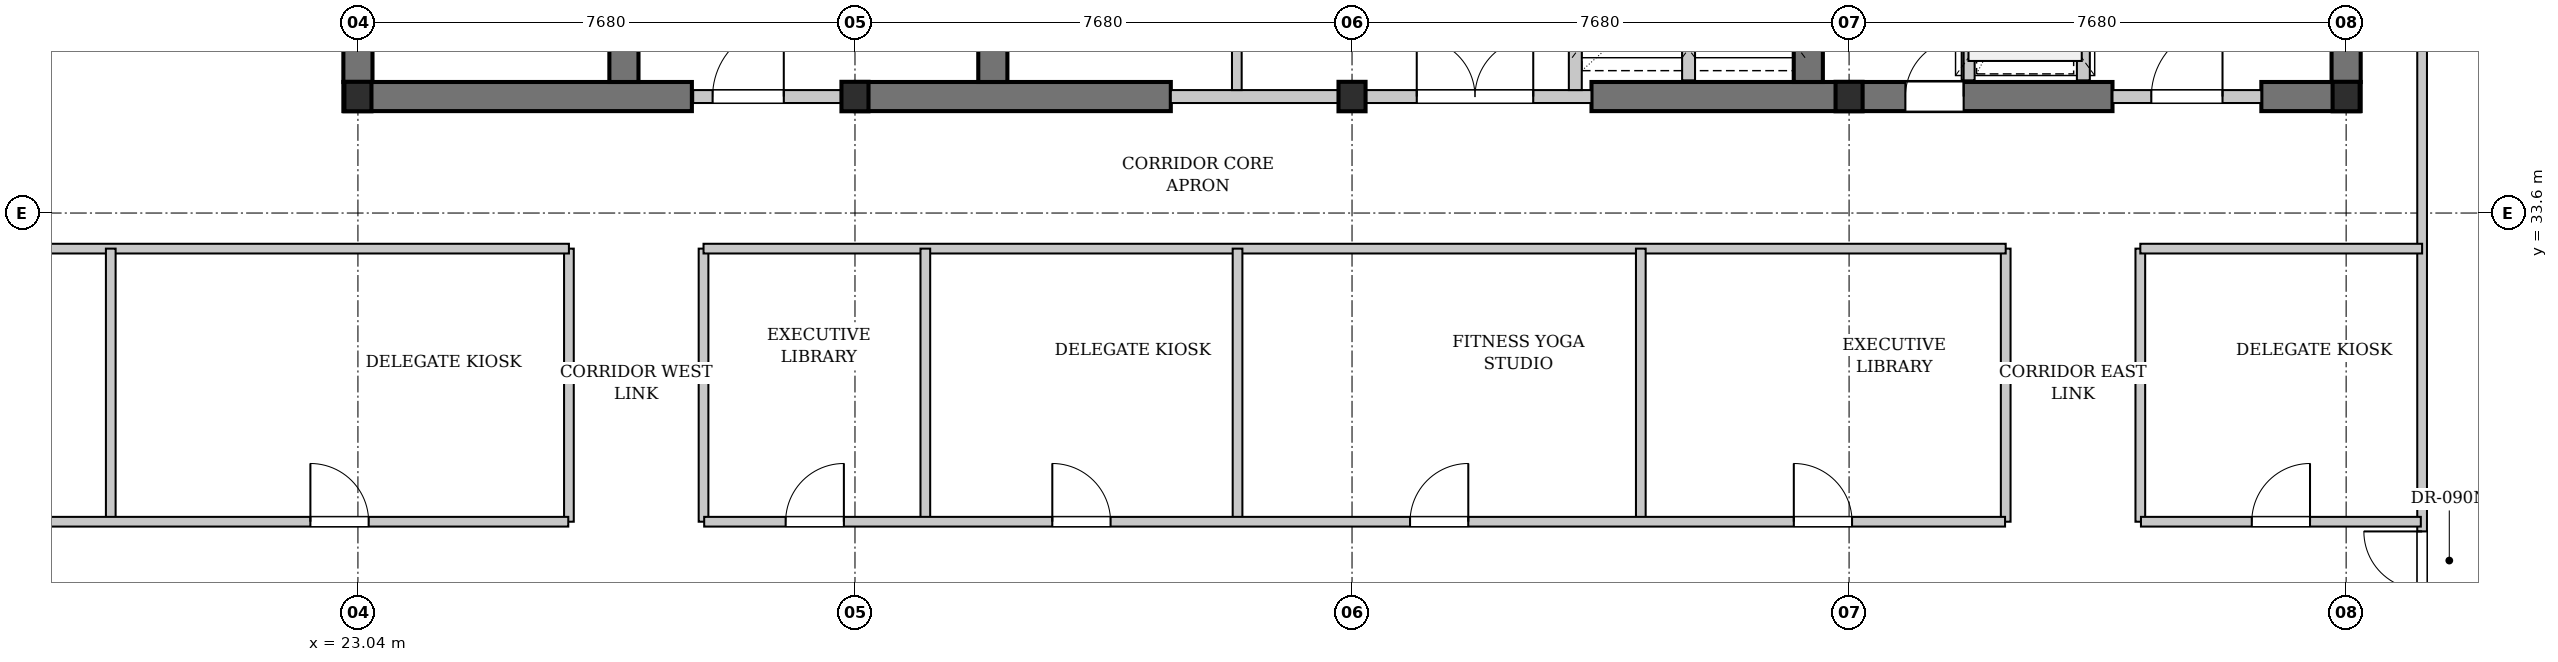
"""IFC4 building model, lengths in metres.
Left out: names, types, materials, properties, quantities, classifications, styles, units other than length and angle.
Written with IfcOpenShell. Run it as: python <this file> out.ifc"""

import sys

from ifc_helpers import new_model, si_unit, direction, frame, frame_2d, origin, origin_2d, place, context, subcontext, project, spatial, rectangle, i_section, extrude, element, fill, save


model = new_model("IFC4")
c1 = context("Model", 3, precision=1e-05, world=origin(), true_north=direction((0.0, 1.0)))
c2 = subcontext(c1, "Body", "Model", "MODEL_VIEW")
j1 = project(units=[si_unit("LENGTHUNIT", "METRE"), si_unit("PLANEANGLEUNIT", "RADIAN")], contexts=[c1])
p1 = place(None, origin())
s1 = spatial("IfcSite", under=j1, at=p1, CompositionType="ELEMENT")
p2 = place(p1, origin())
s2 = spatial("IfcBuilding", under=s1, at=p2, CompositionType="ELEMENT")
p3 = place(p2, frame((0.0, 0.0, 172.1)))
s3 = spatial("IfcBuildingStorey", under=s2, at=p3, CompositionType="ELEMENT", Elevation=172.1)
p4 = place(p3, frame((22.815, 35.4, 0.0), z_axis=(0.0, 0.0, 1.0), x_axis=(1.0, 0.0, 0.0)))
e1 = element("IfcWall", 1, at=p4, inside=s3, PredefinedType="SHEAR", context=c2, shape_type="SweptSolid", body=[
    extrude(rectangle(XDim=5.385, YDim=0.45, at=frame_2d((2.692, 0.0))), origin(), (0.0, 0.0, 1.0), 3.08),
])
p5 = place(p3, frame((30.72, 35.4, 0.0), z_axis=(0.0, 0.0, 1.0), x_axis=(1.0, 0.0, 0.0)))
e2 = element("IfcWall", 2, at=p5, inside=s3, PredefinedType="SHEAR", context=c2, shape_type="SweptSolid", body=[
    extrude(rectangle(XDim=4.88, YDim=0.45, at=frame_2d((2.44, 0.0))), origin(), (0.0, 0.0, 1.0), 3.08),
])
p6 = place(p3, frame((42.1, 35.4, 0.0), z_axis=(0.0, 0.0, 1.0), x_axis=(1.0, 0.0, 0.0)))
e3 = element("IfcWall", 3, at=p6, inside=s3, PredefinedType="SHEAR", context=c2, shape_type="SweptSolid", body=[
    extrude(rectangle(XDim=8.05, YDim=0.45, at=frame_2d((4.025, 0.0))), origin(), (0.0, 0.0, 1.0), 3.08),
])
p7 = place(p6, frame((4.85, 0.0, 0.0)))
e4 = element("IfcOpeningElement", 4, at=p7, cuts=e3, PredefinedType="OPENING", context=c2, shape_type="SweptSolid", body=[
    extrude(rectangle(XDim=0.9, YDim=2.15, at=frame_2d((0.45, 1.075))), frame((0.0, 0.235, 0.0), z_axis=(0.0, -1.0, 0.0), x_axis=(1.0, 0.0, 0.0)), (0.0, 0.0, 1.0), 0.47),
])
p8 = place(p3, frame((52.45, 35.4, 0.0), z_axis=(0.0, 0.0, 1.0), x_axis=(1.0, 0.0, 0.0)))
e5 = element("IfcWall", 5, at=p8, inside=s3, PredefinedType="SHEAR", context=c2, shape_type="SweptSolid", body=[
    extrude(rectangle(XDim=1.535, YDim=0.45, at=frame_2d((0.768, 0.0))), origin(), (0.0, 0.0, 1.0), 3.08),
])
p9 = place(p3, frame((23.04, 35.625, 0.0), z_axis=(0.0, 0.0, 1.0), x_axis=(0.0, 1.0, 0.0)))
e6 = element("IfcWall", 6, at=p9, inside=s3, PredefinedType="SHEAR", context=c2, shape_type="SweptSolid", body=[
    extrude(rectangle(XDim=10.35, YDim=0.45, at=frame_2d((5.175, 0.0))), origin(), (0.0, 0.0, 1.0), 3.08),
])
p10 = place(p3, frame((27.15, 35.625, 0.0), z_axis=(0.0, 0.0, 1.0), x_axis=(0.0, 1.0, 0.0)))
e7 = element("IfcWall", 7, at=p10, inside=s3, PredefinedType="SHEAR", context=c2, shape_type="SweptSolid", body=[
    extrude(rectangle(XDim=10.35, YDim=0.45, at=frame_2d((5.175, 0.0))), origin(), (0.0, 0.0, 1.0), 3.08),
])
p11 = place(p10, frame((0.675, 0.0, 0.0)))
e8 = element("IfcOpeningElement", 8, at=p11, cuts=e7, PredefinedType="OPENING", context=c2, shape_type="SweptSolid", body=[
    extrude(rectangle(XDim=1.1, YDim=2.15, at=frame_2d((0.55, 1.075))), frame((0.0, 0.235, 0.0), z_axis=(0.0, -1.0, 0.0), x_axis=(1.0, 0.0, 0.0)), (0.0, 0.0, 1.0), 0.47),
])
for number, where, z_axis, x_axis in (
    (9, (32.85, 35.625, 0.0), (0.0, 0.0, 1.0), (0.0, 1.0, 0.0)),
    (10, (45.45, 35.625, 0.0), (0.0, 0.0, 1.0), (0.0, 1.0, 0.0)),
    (11, (53.76, 35.625, 0.0), (0.0, 0.0, 1.0), (0.0, 1.0, 0.0)),
):
    element("IfcWall", number, at=place(p3, frame(where, z_axis=z_axis, x_axis=x_axis)), inside=s3, PredefinedType="SHEAR", context=c2, shape_type="SweptSolid", body=[
        extrude(rectangle(XDim=10.35, YDim=0.45, at=frame_2d((5.175, 0.0))), origin(), (0.0, 0.0, 1.0), 3.08),
    ])
for number, where, z_axis, x_axis in (
    (12, (23.04, 35.4, 0.0), (0.0, 0.0, 1.0), (1.0, 0.0, 0.0)),
    (13, (30.72, 35.4, 0.0), (0.0, 0.0, 1.0), (1.0, 0.0, 0.0)),
    (14, (38.4, 35.4, 0.0), (0.0, 0.0, 1.0), (1.0, 0.0, 0.0)),
    (15, (46.08, 35.4, 0.0), (0.0, 0.0, 1.0), (1.0, 0.0, 0.0)),
    (16, (53.76, 35.4, 0.0), (0.0, 0.0, 1.0), (1.0, 0.0, 0.0)),
):
    element("IfcColumn", number, at=place(p3, frame(where, z_axis=z_axis, x_axis=x_axis)), inside=s3, PredefinedType="COLUMN", context=c2, shape_type="SweptSolid", body=[
        extrude(i_section(OverallWidth=0.418, OverallDepth=0.455, WebThickness=0.042, FlangeThickness=0.068, FilletRadius=0.015, at=origin_2d()), origin(), (0.0, 0.0, 1.0), 3.3),
    ])
p12 = place(p3, frame((28.22, 35.4, 0.0), z_axis=(0.0, 0.0, 1.0), x_axis=(1.0, 0.0, 0.0)))
e17 = element("IfcWall", 17, at=p12, inside=s3, PredefinedType="PARTITIONING", context=c2, shape_type="SweptSolid", body=[
    extrude(rectangle(XDim=2.5, YDim=0.2, at=frame_2d((1.25, 0.0))), origin(), (0.0, 0.0, 1.0), 2.475),
])
p13 = place(p12, frame((0.3, 0.0, 0.0)))
e18 = element("IfcOpeningElement", 18, at=p13, cuts=e17, PredefinedType="OPENING", context=c2, shape_type="SweptSolid", body=[
    extrude(rectangle(XDim=1.1, YDim=2.15, at=frame_2d((0.55, 1.075))), frame((0.0, 0.11, 0.0), z_axis=(0.0, -1.0, 0.0), x_axis=(1.0, 0.0, 0.0)), (0.0, 0.0, 1.0), 0.22),
])
p14 = place(p3, frame((35.6, 35.4, 0.0), z_axis=(0.0, 0.0, 1.0), x_axis=(1.0, 0.0, 0.0)))
e19 = element("IfcWall", 19, at=p14, inside=s3, PredefinedType="PARTITIONING", context=c2, shape_type="SweptSolid", body=[
    extrude(rectangle(XDim=6.5, YDim=0.2, at=frame_2d((3.25, 0.0))), origin(), (0.0, 0.0, 1.0), 2.475),
])
p15 = place(p14, frame((3.8, 0.0, 0.0)))
e20 = element("IfcOpeningElement", 20, at=p15, cuts=e19, PredefinedType="OPENING", context=c2, shape_type="SweptSolid", body=[
    extrude(rectangle(XDim=1.8, YDim=2.3, at=frame_2d((0.9, 1.15))), frame((0.0, 0.11, 0.0), z_axis=(0.0, -1.0, 0.0), x_axis=(1.0, 0.0, 0.0)), (0.0, 0.0, 1.0), 0.22),
])
p16 = place(p3, frame((36.62, 35.5, 0.0), z_axis=(0.0, 0.0, 1.0), x_axis=(0.0, 1.0, 0.0)))
e21 = element("IfcWall", 21, at=p16, inside=s3, PredefinedType="PARTITIONING", context=c2, shape_type="SweptSolid", body=[
    extrude(rectangle(XDim=10.42, YDim=0.15, at=frame_2d((5.21, 0.0))), origin(), (0.0, 0.0, 1.0), 3.08),
])
p17 = place(p16, frame((3.92, 0.0, 0.0)))
e22 = element("IfcOpeningElement", 22, at=p17, cuts=e21, PredefinedType="OPENING", context=c2, shape_type="SweptSolid", body=[
    extrude(rectangle(XDim=0.9, YDim=2.15, at=frame_2d((0.45, 1.075))), frame((0.0, 0.085, 0.0), z_axis=(0.0, -1.0, 0.0), x_axis=(1.0, 0.0, 0.0)), (0.0, 0.0, 1.0), 0.17),
])
p18 = place(p16, frame((5.85, 0.0, 0.0)))
e23 = element("IfcOpeningElement", 23, at=p18, cuts=e21, PredefinedType="OPENING", context=c2, shape_type="SweptSolid", body=[
    extrude(rectangle(XDim=0.9, YDim=2.15, at=frame_2d((0.45, 1.075))), frame((0.0, 0.085, 0.0), z_axis=(0.0, -1.0, 0.0), x_axis=(1.0, 0.0, 0.0)), (0.0, 0.0, 1.0), 0.17),
])
p19 = place(p3, frame((43.6, 35.65, 0.0), z_axis=(0.0, 0.0, 1.0), x_axis=(0.0, 1.0, 0.0)))
e24 = element("IfcWall", 24, at=p19, inside=s3, PredefinedType="PARTITIONING", context=c2, shape_type="SweptSolid", body=[
    extrude(rectangle(XDim=3.25, YDim=0.2, at=frame_2d((1.625, 0.0))), origin(), (0.0, 0.0, 1.0), 3.08),
])
p20 = place(p3, frame((41.85, 35.5, 0.0), z_axis=(0.0, 0.0, 1.0), x_axis=(0.0, 1.0, 0.0)))
e25 = element("IfcWall", 25, at=p20, inside=s3, PredefinedType="PARTITIONING", context=c2, shape_type="SweptSolid", body=[
    extrude(rectangle(XDim=3.4, YDim=0.2, at=frame_2d((1.7, 0.0))), origin(), (0.0, 0.0, 1.0), 3.08),
])
p21 = place(p3, frame((50.15, 35.4, 0.0), z_axis=(0.0, 0.0, 1.0), x_axis=(1.0, 0.0, 0.0)))
e26 = element("IfcWall", 26, at=p21, inside=s3, PredefinedType="PARTITIONING", context=c2, shape_type="SweptSolid", body=[
    extrude(rectangle(XDim=2.3, YDim=0.2, at=frame_2d((1.15, 0.0))), origin(), (0.0, 0.0, 1.0), 2.475),
])
p22 = place(p21, frame((0.6, 0.0, 0.0)))
e27 = element("IfcOpeningElement", 27, at=p22, cuts=e26, PredefinedType="OPENING", context=c2, shape_type="SweptSolid", body=[
    extrude(rectangle(XDim=1.1, YDim=2.15, at=frame_2d((0.55, 1.075))), frame((0.0, 0.11, 0.0), z_axis=(0.0, -1.0, 0.0), x_axis=(1.0, 0.0, 0.0)), (0.0, 0.0, 1.0), 0.22),
])
p23 = place(p3, frame((49.7, 35.65, 0.0), z_axis=(0.0, 0.0, 1.0), x_axis=(0.0, 1.0, 0.0)))
e28 = element("IfcWall", 28, at=p23, inside=s3, PredefinedType="PARTITIONING", context=c2, shape_type="SweptSolid", body=[
    extrude(rectangle(XDim=3.15, YDim=0.2, at=frame_2d((1.575, 0.0))), origin(), (0.0, 0.0, 1.0), 3.08),
])
p24 = place(p23, frame((0.85, 0.0, 0.0)))
e29 = element("IfcOpeningElement", 29, at=p24, cuts=e28, PredefinedType="OPENING", context=c2, shape_type="SweptSolid", body=[
    extrude(rectangle(XDim=1.2, YDim=2.2, at=frame_2d((0.6, 1.1))), frame((0.0, 0.11, 0.0), z_axis=(0.0, -1.0, 0.0), x_axis=(1.0, 0.0, 0.0)), (0.0, 0.0, 1.0), 0.22),
])
p25 = place(p3, frame((47.92, 35.65, 0.0), z_axis=(0.0, 0.0, 1.0), x_axis=(0.0, 1.0, 0.0)))
e30 = element("IfcWall", 30, at=p25, inside=s3, PredefinedType="PARTITIONING", context=c2, shape_type="SweptSolid", body=[
    extrude(rectangle(XDim=3.15, YDim=0.2, at=frame_2d((1.575, 0.0))), origin(), (0.0, 0.0, 1.0), 3.08),
])
p26 = place(p3, frame((54.934, 26.75, 0.0), z_axis=(0.0, 0.0, 1.0), x_axis=(0.0, 1.0, 0.0)))
e31 = element("IfcWall", 31, at=p26, inside=s3, PredefinedType="PARTITIONING", context=c2, shape_type="SweptSolid", body=[
    extrude(rectangle(XDim=19.635, YDim=0.15, at=frame_2d((9.818, 0.0))), origin(), (0.0, 0.0, 1.0), 3.08),
])
p27 = place(p26, frame((1.03, 0.0, 0.0)))
e32 = element("IfcOpeningElement", 32, at=p27, cuts=e31, PredefinedType="OPENING", context=c2, shape_type="SweptSolid", body=[
    extrude(rectangle(XDim=0.9, YDim=2.15, at=frame_2d((0.45, 1.075))), frame((0.0, 0.085, 0.0), z_axis=(0.0, -1.0, 0.0), x_axis=(1.0, 0.0, 0.0)), (0.0, 0.0, 1.0), 0.17),
])
for number, where, z_axis, x_axis in (
    (33, (26.3, 28.83, 0.0), (0.0, 0.0, 1.0), (0.0, 1.0, 0.0)),
    (34, (28.38, 28.83, 0.0), (0.0, 0.0, 1.0), (0.0, 1.0, 0.0)),
    (35, (48.5, 28.83, 0.0), (0.0, 0.0, 1.0), (0.0, 1.0, 0.0)),
    (36, (50.58, 28.83, 0.0), (0.0, 0.0, 1.0), (0.0, 1.0, 0.0)),
):
    element("IfcWall", number, at=place(p3, frame(where, z_axis=z_axis, x_axis=x_axis)), inside=s3, PredefinedType="PARTITIONING", context=c2, shape_type="SweptSolid", body=[
        extrude(rectangle(XDim=4.22, YDim=0.15, at=frame_2d((2.11, 0.0))), origin(), (0.0, 0.0, 1.0), 3.08),
    ])
p28 = place(p3, frame((9.029, 33.05, 0.0), z_axis=(0.0, 0.0, 1.0), x_axis=(1.0, 0.0, 0.0)))
e37 = element("IfcWall", 37, at=p28, inside=s3, PredefinedType="PARTITIONING", context=c2, shape_type="SweptSolid", body=[
    extrude(rectangle(XDim=17.271, YDim=0.15, at=frame_2d((8.635, 0.0))), origin(), (0.0, 0.0, 1.0), 2.475),
])
p29 = place(p3, frame((28.38, 33.05, 0.0), z_axis=(0.0, 0.0, 1.0), x_axis=(1.0, 0.0, 0.0)))
e38 = element("IfcWall", 38, at=p29, inside=s3, PredefinedType="PARTITIONING", context=c2, shape_type="SweptSolid", body=[
    extrude(rectangle(XDim=20.12, YDim=0.15, at=frame_2d((10.06, 0.0))), origin(), (0.0, 0.0, 1.0), 3.08),
])
p30 = place(p3, frame((50.58, 33.05, 0.0), z_axis=(0.0, 0.0, 1.0), x_axis=(1.0, 0.0, 0.0)))
e39 = element("IfcWall", 39, at=p30, inside=s3, PredefinedType="PARTITIONING", context=c2, shape_type="SweptSolid", body=[
    extrude(rectangle(XDim=4.354, YDim=0.15, at=frame_2d((2.177, 0.0))), origin(), (0.0, 0.0, 1.0), 3.08),
])
p31 = place(p3, frame((19.221, 28.83, 0.0), z_axis=(0.0, 0.0, 1.0), x_axis=(0.0, 1.0, 0.0)))
e40 = element("IfcWall", 40, at=p31, inside=s3, PredefinedType="PARTITIONING", context=c2, shape_type="SweptSolid", body=[
    extrude(rectangle(XDim=4.22, YDim=0.15, at=frame_2d((2.11, 0.0))), origin(), (0.0, 0.0, 1.0), 2.475),
])
p32 = place(p3, frame((9.049, 28.83, 0.0), z_axis=(0.0, 0.0, 1.0), x_axis=(1.0, 0.0, 0.0)))
e41 = element("IfcWall", 41, at=p32, inside=s3, PredefinedType="PARTITIONING", context=c2, shape_type="SweptSolid", body=[
    extrude(rectangle(XDim=17.241, YDim=0.15, at=frame_2d((8.621, 0.0))), origin(), (0.0, 0.0, 1.0), 2.475),
])
p33 = place(p32, frame((1.532, 0.0, 0.0)))
e42 = element("IfcOpeningElement", 42, at=p33, cuts=e41, PredefinedType="OPENING", context=c2, shape_type="SweptSolid", body=[
    extrude(rectangle(XDim=0.9, YDim=2.15, at=frame_2d((0.45, 1.075))), frame((0.0, 0.085, 0.0), z_axis=(0.0, -1.0, 0.0), x_axis=(1.0, 0.0, 0.0)), (0.0, 0.0, 1.0), 0.17),
])
p34 = place(p32, frame((6.618, 0.0, 0.0)))
e43 = element("IfcOpeningElement", 43, at=p34, cuts=e41, PredefinedType="OPENING", context=c2, shape_type="SweptSolid", body=[
    extrude(rectangle(XDim=0.9, YDim=2.15, at=frame_2d((0.45, 1.075))), frame((0.0, 0.085, 0.0), z_axis=(0.0, -1.0, 0.0), x_axis=(1.0, 0.0, 0.0)), (0.0, 0.0, 1.0), 0.17),
])
p35 = place(p32, frame((13.257, 0.0, 0.0)))
e44 = element("IfcOpeningElement", 44, at=p35, cuts=e41, PredefinedType="OPENING", context=c2, shape_type="SweptSolid", body=[
    extrude(rectangle(XDim=0.9, YDim=2.15, at=frame_2d((0.45, 1.075))), frame((0.0, 0.085, 0.0), z_axis=(0.0, -1.0, 0.0), x_axis=(1.0, 0.0, 0.0)), (0.0, 0.0, 1.0), 0.17),
])
for number, where, z_axis, x_axis in (
    (45, (31.807, 28.83, 0.0), (0.0, 0.0, 1.0), (0.0, 1.0, 0.0)),
    (46, (36.631, 28.83, 0.0), (0.0, 0.0, 1.0), (0.0, 1.0, 0.0)),
    (47, (42.862, 28.83, 0.0), (0.0, 0.0, 1.0), (0.0, 1.0, 0.0)),
):
    element("IfcWall", number, at=place(p3, frame(where, z_axis=z_axis, x_axis=x_axis)), inside=s3, PredefinedType="PARTITIONING", context=c2, shape_type="SweptSolid", body=[
        extrude(rectangle(XDim=4.22, YDim=0.15, at=frame_2d((2.11, 0.0))), origin(), (0.0, 0.0, 1.0), 3.08),
    ])
p36 = place(p3, frame((28.39, 28.83, 0.0), z_axis=(0.0, 0.0, 1.0), x_axis=(1.0, 0.0, 0.0)))
e48 = element("IfcWall", 48, at=p36, inside=s3, PredefinedType="PARTITIONING", context=c2, shape_type="SweptSolid", body=[
    extrude(rectangle(XDim=20.1, YDim=0.15, at=frame_2d((10.05, 0.0))), origin(), (0.0, 0.0, 1.0), 3.08),
])
p37 = place(p36, frame((1.259, 0.0, 0.0)))
e49 = element("IfcOpeningElement", 49, at=p37, cuts=e48, PredefinedType="OPENING", context=c2, shape_type="SweptSolid", body=[
    extrude(rectangle(XDim=0.9, YDim=2.15, at=frame_2d((0.45, 1.075))), frame((0.0, 0.085, 0.0), z_axis=(0.0, -1.0, 0.0), x_axis=(1.0, 0.0, 0.0)), (0.0, 0.0, 1.0), 0.17),
])
p38 = place(p36, frame((5.379, 0.0, 0.0)))
e50 = element("IfcOpeningElement", 50, at=p38, cuts=e48, PredefinedType="OPENING", context=c2, shape_type="SweptSolid", body=[
    extrude(rectangle(XDim=0.9, YDim=2.15, at=frame_2d((0.45, 1.075))), frame((0.0, 0.085, 0.0), z_axis=(0.0, -1.0, 0.0), x_axis=(1.0, 0.0, 0.0)), (0.0, 0.0, 1.0), 0.17),
])
p39 = place(p36, frame((10.906, 0.0, 0.0)))
e51 = element("IfcOpeningElement", 51, at=p39, cuts=e48, PredefinedType="OPENING", context=c2, shape_type="SweptSolid", body=[
    extrude(rectangle(XDim=0.9, YDim=2.15, at=frame_2d((0.45, 1.075))), frame((0.0, 0.085, 0.0), z_axis=(0.0, -1.0, 0.0), x_axis=(1.0, 0.0, 0.0)), (0.0, 0.0, 1.0), 0.17),
])
p40 = place(p36, frame((16.836, 0.0, 0.0)))
e52 = element("IfcOpeningElement", 52, at=p40, cuts=e48, PredefinedType="OPENING", context=c2, shape_type="SweptSolid", body=[
    extrude(rectangle(XDim=0.9, YDim=2.15, at=frame_2d((0.45, 1.075))), frame((0.0, 0.085, 0.0), z_axis=(0.0, -1.0, 0.0), x_axis=(1.0, 0.0, 0.0)), (0.0, 0.0, 1.0), 0.17),
])
p41 = place(p3, frame((50.59, 28.83, 0.0), z_axis=(0.0, 0.0, 1.0), x_axis=(1.0, 0.0, 0.0)))
e53 = element("IfcWall", 53, at=p41, inside=s3, PredefinedType="PARTITIONING", context=c2, shape_type="SweptSolid", body=[
    extrude(rectangle(XDim=4.324, YDim=0.15, at=frame_2d((2.162, 0.0))), origin(), (0.0, 0.0, 1.0), 3.08),
])
p42 = place(p41, frame((1.712, 0.0, 0.0)))
e54 = element("IfcOpeningElement", 54, at=p42, cuts=e53, PredefinedType="OPENING", context=c2, shape_type="SweptSolid", body=[
    extrude(rectangle(XDim=0.9, YDim=2.15, at=frame_2d((0.45, 1.075))), frame((0.0, 0.085, 0.0), z_axis=(0.0, -1.0, 0.0), x_axis=(1.0, 0.0, 0.0)), (0.0, 0.0, 1.0), 0.17),
])
p43 = place(p13, origin())
e55 = element("IfcDoor", 55, at=p43, inside=s3, OperationType="SINGLE_SWING_RIGHT", PredefinedType="DOOR", context=c2, shape_type="SweptSolid", body=[
    extrude(rectangle(XDim=1.1, YDim=2.15, at=frame_2d((0.55, 1.075))), frame((0.0, 0.025, 0.0), z_axis=(0.0, -1.0, 0.0), x_axis=(1.0, 0.0, 0.0)), (0.0, 0.0, 1.0), 0.05),
])
fill(e18, e55)
p44 = place(p15, origin())
e56 = element("IfcDoor", 56, at=p44, inside=s3, OperationType="DOUBLE_DOOR_SINGLE_SWING", PredefinedType="DOOR", context=c2, shape_type="SweptSolid", body=[
    extrude(rectangle(XDim=1.8, YDim=2.3, at=frame_2d((0.9, 1.15))), frame((0.0, 0.025, 0.0), z_axis=(0.0, -1.0, 0.0), x_axis=(1.0, 0.0, 0.0)), (0.0, 0.0, 1.0), 0.05),
])
fill(e20, e56)
p45 = place(p22, origin())
e57 = element("IfcDoor", 57, at=p45, inside=s3, OperationType="SINGLE_SWING_RIGHT", PredefinedType="DOOR", context=c2, shape_type="SweptSolid", body=[
    extrude(rectangle(XDim=1.1, YDim=2.15, at=frame_2d((0.55, 1.075))), frame((0.0, 0.025, 0.0), z_axis=(0.0, -1.0, 0.0), x_axis=(1.0, 0.0, 0.0)), (0.0, 0.0, 1.0), 0.05),
])
fill(e27, e57)
p46 = place(p27, origin())
e58 = element("IfcDoor", 58, at=p46, inside=s3, OperationType="SINGLE_SWING_RIGHT", PredefinedType="DOOR", context=c2, shape_type="SweptSolid", body=[
    extrude(rectangle(XDim=0.9, YDim=2.15, at=frame_2d((0.45, 1.075))), frame((0.0, 0.025, 0.0), z_axis=(0.0, -1.0, 0.0), x_axis=(1.0, 0.0, 0.0)), (0.0, 0.0, 1.0), 0.05),
])
fill(e32, e58)
p47 = place(p35, origin())
e59 = element("IfcDoor", 59, at=p47, inside=s3, OperationType="SINGLE_SWING_LEFT", PredefinedType="DOOR", context=c2, shape_type="SweptSolid", body=[
    extrude(rectangle(XDim=0.9, YDim=2.15, at=frame_2d((0.45, 1.075))), frame((0.0, 0.025, 0.0), z_axis=(0.0, -1.0, 0.0), x_axis=(1.0, 0.0, 0.0)), (0.0, 0.0, 1.0), 0.05),
])
fill(e44, e59)
p48 = place(p37, origin())
e60 = element("IfcDoor", 60, at=p48, inside=s3, OperationType="SINGLE_SWING_RIGHT", PredefinedType="DOOR", context=c2, shape_type="SweptSolid", body=[
    extrude(rectangle(XDim=0.9, YDim=2.15, at=frame_2d((0.45, 1.075))), frame((0.0, 0.025, 0.0), z_axis=(0.0, -1.0, 0.0), x_axis=(1.0, 0.0, 0.0)), (0.0, 0.0, 1.0), 0.05),
])
fill(e49, e60)
p49 = place(p38, origin())
e61 = element("IfcDoor", 61, at=p49, inside=s3, OperationType="SINGLE_SWING_LEFT", PredefinedType="DOOR", context=c2, shape_type="SweptSolid", body=[
    extrude(rectangle(XDim=0.9, YDim=2.15, at=frame_2d((0.45, 1.075))), frame((0.0, 0.025, 0.0), z_axis=(0.0, -1.0, 0.0), x_axis=(1.0, 0.0, 0.0)), (0.0, 0.0, 1.0), 0.05),
])
fill(e50, e61)
p50 = place(p39, origin())
e62 = element("IfcDoor", 62, at=p50, inside=s3, OperationType="SINGLE_SWING_RIGHT", PredefinedType="DOOR", context=c2, shape_type="SweptSolid", body=[
    extrude(rectangle(XDim=0.9, YDim=2.15, at=frame_2d((0.45, 1.075))), frame((0.0, 0.025, 0.0), z_axis=(0.0, -1.0, 0.0), x_axis=(1.0, 0.0, 0.0)), (0.0, 0.0, 1.0), 0.05),
])
fill(e51, e62)
p51 = place(p40, origin())
e63 = element("IfcDoor", 63, at=p51, inside=s3, OperationType="SINGLE_SWING_LEFT", PredefinedType="DOOR", context=c2, shape_type="SweptSolid", body=[
    extrude(rectangle(XDim=0.9, YDim=2.15, at=frame_2d((0.45, 1.075))), frame((0.0, 0.025, 0.0), z_axis=(0.0, -1.0, 0.0), x_axis=(1.0, 0.0, 0.0)), (0.0, 0.0, 1.0), 0.05),
])
fill(e52, e63)
p52 = place(p42, origin())
e64 = element("IfcDoor", 64, at=p52, inside=s3, OperationType="SINGLE_SWING_RIGHT", PredefinedType="DOOR", context=c2, shape_type="SweptSolid", body=[
    extrude(rectangle(XDim=0.9, YDim=2.15, at=frame_2d((0.45, 1.075))), frame((0.0, 0.025, 0.0), z_axis=(0.0, -1.0, 0.0), x_axis=(1.0, 0.0, 0.0)), (0.0, 0.0, 1.0), 0.05),
])
fill(e54, e64)
p53 = place(p7, origin())
e65 = element("IfcDoor", 65, at=p53, inside=s3, OperationType="SINGLE_SWING_RIGHT", PredefinedType="DOOR", context=c2, shape_type="SweptSolid", body=[
    extrude(rectangle(XDim=0.9, YDim=2.15, at=frame_2d((0.45, 1.075))), frame((0.0, 0.025, 0.0), z_axis=(0.0, -1.0, 0.0), x_axis=(1.0, 0.0, 0.0)), (0.0, 0.0, 1.0), 0.05),
])
fill(e4, e65)
save(model, sys.argv[1])
